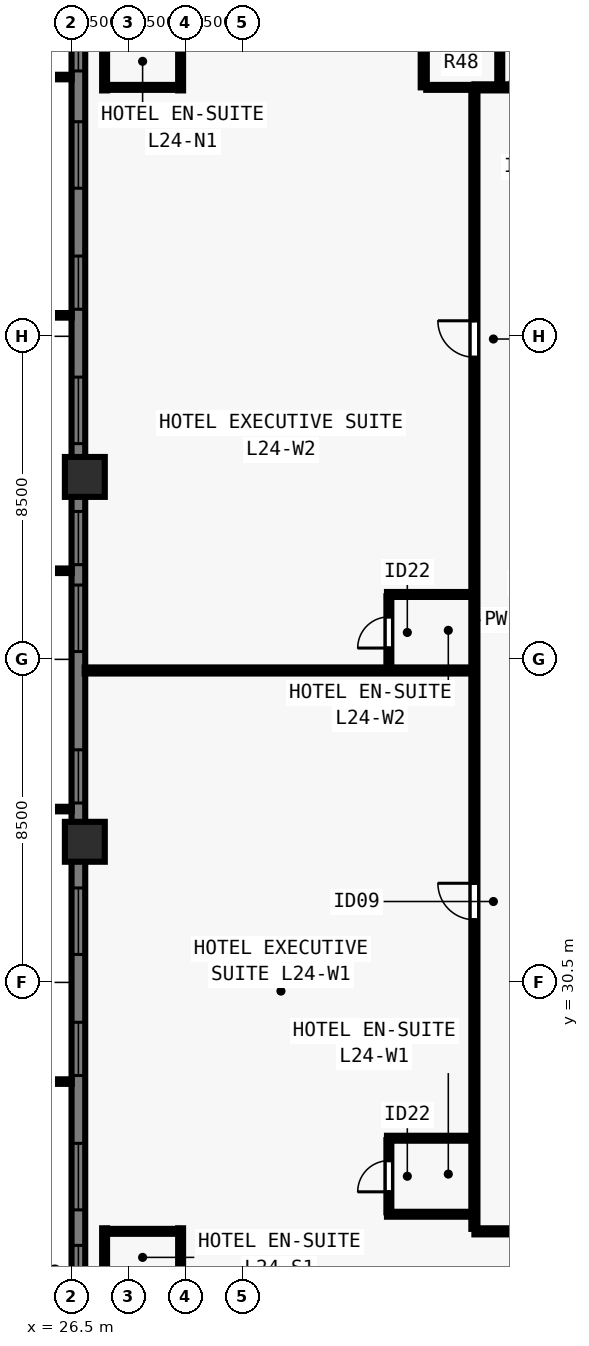
"""IFC4 building model, lengths in metres.
Left out: names, types, materials, properties, quantities, classifications, styles, units other than length and angle.
Written with IfcOpenShell. Run it as: python <this file> out.ifc"""

import sys

from ifc_helpers import new_model, si_unit, direction, frame, frame_2d, origin, origin_2d, place, context, subcontext, project, spatial, rectangle, extrude, element, fill, save


model = new_model("IFC4")
c1 = context("Model", 3, precision=1e-05, world=origin(), true_north=direction((0.0, 1.0)))
c2 = subcontext(c1, "Body", "Model", "MODEL_VIEW")
j1 = project(units=[si_unit("LENGTHUNIT", "METRE"), si_unit("PLANEANGLEUNIT", "RADIAN")], contexts=[c1])
p1 = place(None, origin())
s1 = spatial("IfcSite", under=j1, at=p1, CompositionType="ELEMENT")
p2 = place(p1, origin())
s2 = spatial("IfcBuilding", under=s1, at=p2, CompositionType="ELEMENT")
p3 = place(p2, frame((0.0, 0.0, 90.0)))
s3 = spatial("IfcBuildingStorey", under=s2, at=p3, CompositionType="ELEMENT", Elevation=90.0)
for number, where, z_axis, x_axis in (
    (1, (26.85, 43.8, 0.0), (0.0, 0.0, 1.0), (0.0, 1.0, 0.0)),
    (2, (26.85, 34.2, 0.0), (0.0, 0.0, 1.0), (0.0, 1.0, 0.0)),
):
    element("IfcColumn", number, at=place(p3, frame(where, z_axis=z_axis, x_axis=x_axis)), inside=s3, PredefinedType="COLUMN", context=c2, shape_type="SweptSolid", body=[
        extrude(rectangle(XDim=1.05, YDim=1.05, at=origin_2d()), origin(), (0.0, 0.0, 1.0), 3.5),
    ])
p4 = place(p3, frame((26.68, 16.5, 0.0), z_axis=(0.0, 0.0, 1.0), x_axis=(0.0, 1.0, 0.0)))
e3 = element("IfcWall", 3, at=p4, inside=s3, PredefinedType="SOLIDWALL", context=c2, shape_type="SweptSolid", body=[
    extrude(rectangle(XDim=44.662, YDim=0.36, at=frame_2d((22.331, 0.0))), origin(), (0.0, 0.0, 1.0), 3.28),
])
p5 = place(p4, frame((5.68, 0.0, 0.8)))
e4 = element("IfcOpeningElement", 4, at=p5, cuts=e3, PredefinedType="OPENING", context=c2, shape_type="SweptSolid", body=[
    extrude(rectangle(XDim=1.4, YDim=1.544, at=frame_2d((0.7, 0.772))), frame((0.0, 0.19, 0.0), z_axis=(0.0, -1.0, 0.0), x_axis=(1.0, 0.0, 0.0)), (0.0, 0.0, 1.0), 0.38),
])
p6 = place(p4, frame((8.015, 0.0, 0.8)))
e5 = element("IfcOpeningElement", 5, at=p6, cuts=e3, PredefinedType="OPENING", context=c2, shape_type="SweptSolid", body=[
    extrude(rectangle(XDim=1.75, YDim=1.544, at=frame_2d((0.875, 0.772))), frame((0.0, 0.19, 0.0), z_axis=(0.0, -1.0, 0.0), x_axis=(1.0, 0.0, 0.0)), (0.0, 0.0, 1.0), 0.38),
])
p7 = place(p4, frame((11.551, 0.0, 0.8)))
e6 = element("IfcOpeningElement", 6, at=p7, cuts=e3, PredefinedType="OPENING", context=c2, shape_type="SweptSolid", body=[
    extrude(rectangle(XDim=1.4, YDim=1.544, at=frame_2d((0.7, 0.772))), frame((0.0, 0.19, 0.0), z_axis=(0.0, -1.0, 0.0), x_axis=(1.0, 0.0, 0.0)), (0.0, 0.0, 1.0), 0.38),
])
p8 = place(p4, frame((14.736, 0.0, 0.8)))
e7 = element("IfcOpeningElement", 7, at=p8, cuts=e3, PredefinedType="OPENING", context=c2, shape_type="SweptSolid", body=[
    extrude(rectangle(XDim=1.75, YDim=1.544, at=frame_2d((0.875, 0.772))), frame((0.0, 0.19, 0.0), z_axis=(0.0, -1.0, 0.0), x_axis=(1.0, 0.0, 0.0)), (0.0, 0.0, 1.0), 0.38),
])
p9 = place(p4, frame((18.721, 0.0, 0.8)))
e8 = element("IfcOpeningElement", 8, at=p9, cuts=e3, PredefinedType="OPENING", context=c2, shape_type="SweptSolid", body=[
    extrude(rectangle(XDim=1.4, YDim=1.544, at=frame_2d((0.7, 0.772))), frame((0.0, 0.19, 0.0), z_axis=(0.0, -1.0, 0.0), x_axis=(1.0, 0.0, 0.0)), (0.0, 0.0, 1.0), 0.38),
])
p10 = place(p4, frame((22.706, 0.0, 0.8)))
e9 = element("IfcOpeningElement", 9, at=p10, cuts=e3, PredefinedType="OPENING", context=c2, shape_type="SweptSolid", body=[
    extrude(rectangle(XDim=1.75, YDim=1.544, at=frame_2d((0.875, 0.772))), frame((0.0, 0.19, 0.0), z_axis=(0.0, -1.0, 0.0), x_axis=(1.0, 0.0, 0.0)), (0.0, 0.0, 1.0), 0.38),
])
p11 = place(p4, frame((24.991, 0.0, 0.8)))
e10 = element("IfcOpeningElement", 10, at=p11, cuts=e3, PredefinedType="OPENING", context=c2, shape_type="SweptSolid", body=[
    extrude(rectangle(XDim=1.4, YDim=1.544, at=frame_2d((0.7, 0.772))), frame((0.0, 0.19, 0.0), z_axis=(0.0, -1.0, 0.0), x_axis=(1.0, 0.0, 0.0)), (0.0, 0.0, 1.0), 0.38),
])
p12 = place(p4, frame((28.177, 0.0, 0.8)))
e11 = element("IfcOpeningElement", 11, at=p12, cuts=e3, PredefinedType="OPENING", context=c2, shape_type="SweptSolid", body=[
    extrude(rectangle(XDim=1.75, YDim=1.544, at=frame_2d((0.875, 0.772))), frame((0.0, 0.19, 0.0), z_axis=(0.0, -1.0, 0.0), x_axis=(1.0, 0.0, 0.0)), (0.0, 0.0, 1.0), 0.38),
])
p13 = place(p4, frame((31.711, 0.0, 0.8)))
e12 = element("IfcOpeningElement", 12, at=p13, cuts=e3, PredefinedType="OPENING", context=c2, shape_type="SweptSolid", body=[
    extrude(rectangle(XDim=1.4, YDim=1.544, at=frame_2d((0.7, 0.772))), frame((0.0, 0.19, 0.0), z_axis=(0.0, -1.0, 0.0), x_axis=(1.0, 0.0, 0.0)), (0.0, 0.0, 1.0), 0.38),
])
p14 = place(p4, frame((34.897, 0.0, 0.8)))
e13 = element("IfcOpeningElement", 13, at=p14, cuts=e3, PredefinedType="OPENING", context=c2, shape_type="SweptSolid", body=[
    extrude(rectangle(XDim=1.75, YDim=1.544, at=frame_2d((0.875, 0.772))), frame((0.0, 0.19, 0.0), z_axis=(0.0, -1.0, 0.0), x_axis=(1.0, 0.0, 0.0)), (0.0, 0.0, 1.0), 0.38),
])
p15 = place(p4, frame((37.982, 0.0, 0.8)))
e14 = element("IfcOpeningElement", 14, at=p15, cuts=e3, PredefinedType="OPENING", context=c2, shape_type="SweptSolid", body=[
    extrude(rectangle(XDim=1.4, YDim=1.544, at=frame_2d((0.7, 0.772))), frame((0.0, 0.19, 0.0), z_axis=(0.0, -1.0, 0.0), x_axis=(1.0, 0.0, 0.0)), (0.0, 0.0, 1.0), 0.38),
])
p16 = place(p3, frame((37.1, 23.95, 0.0), z_axis=(0.0, 0.0, 1.0), x_axis=(1.0, 0.0, 0.0)))
e15 = element("IfcWall", 15, at=p16, inside=s3, PredefinedType="PARTITIONING", context=c2, shape_type="SweptSolid", body=[
    extrude(rectangle(XDim=29.8, YDim=0.16, at=frame_2d((14.9, 0.0))), origin(), (0.0, 0.0, 1.0), 3.28),
])
p17 = place(p16, frame((2.571, 0.0, 0.0)))
e16 = element("IfcOpeningElement", 16, at=p17, cuts=e15, PredefinedType="OPENING", context=c2, shape_type="SweptSolid", body=[
    extrude(rectangle(XDim=0.96, YDim=2.15, at=frame_2d((0.48, 1.075))), frame((0.0, 0.09, 0.0), z_axis=(0.0, -1.0, 0.0), x_axis=(1.0, 0.0, 0.0)), (0.0, 0.0, 1.0), 0.18),
])
p18 = place(p16, frame((15.42, 0.0, 0.0)))
e17 = element("IfcOpeningElement", 17, at=p18, cuts=e15, PredefinedType="OPENING", context=c2, shape_type="SweptSolid", body=[
    extrude(rectangle(XDim=0.96, YDim=2.15, at=frame_2d((0.48, 1.075))), frame((0.0, 0.09, 0.0), z_axis=(0.0, -1.0, 0.0), x_axis=(1.0, 0.0, 0.0)), (0.0, 0.0, 1.0), 0.18),
])
p19 = place(p16, frame((27.269, 0.0, 0.0)))
e18 = element("IfcOpeningElement", 18, at=p19, cuts=e15, PredefinedType="OPENING", context=c2, shape_type="SweptSolid", body=[
    extrude(rectangle(XDim=0.96, YDim=2.15, at=frame_2d((0.48, 1.075))), frame((0.0, 0.09, 0.0), z_axis=(0.0, -1.0, 0.0), x_axis=(1.0, 0.0, 0.0)), (0.0, 0.0, 1.0), 0.18),
])
p20 = place(p3, frame((37.1, 54.05, 0.0), z_axis=(0.0, 0.0, 1.0), x_axis=(1.0, 0.0, 0.0)))
e19 = element("IfcWall", 19, at=p20, inside=s3, PredefinedType="PARTITIONING", context=c2, shape_type="SweptSolid", body=[
    extrude(rectangle(XDim=29.8, YDim=0.16, at=frame_2d((14.9, 0.0))), origin(), (0.0, 0.0, 1.0), 3.28),
])
p21 = place(p20, frame((0.91, 0.0, 0.0)))
e20 = element("IfcOpeningElement", 20, at=p21, cuts=e19, PredefinedType="OPENING", context=c2, shape_type="SweptSolid", body=[
    extrude(rectangle(XDim=0.96, YDim=2.15, at=frame_2d((0.48, 1.075))), frame((0.0, 0.09, 0.0), z_axis=(0.0, -1.0, 0.0), x_axis=(1.0, 0.0, 0.0)), (0.0, 0.0, 1.0), 0.18),
])
p22 = place(p20, frame((3.03, 0.0, 0.0)))
e21 = element("IfcOpeningElement", 21, at=p22, cuts=e19, PredefinedType="OPENING", context=c2, shape_type="SweptSolid", body=[
    extrude(rectangle(XDim=0.96, YDim=2.15, at=frame_2d((0.48, 1.075))), frame((0.0, 0.09, 0.0), z_axis=(0.0, -1.0, 0.0), x_axis=(1.0, 0.0, 0.0)), (0.0, 0.0, 1.0), 0.18),
])
p23 = place(p20, frame((11.39, 0.0, 0.0)))
e22 = element("IfcOpeningElement", 22, at=p23, cuts=e19, PredefinedType="OPENING", context=c2, shape_type="SweptSolid", body=[
    extrude(rectangle(XDim=0.96, YDim=2.15, at=frame_2d((0.48, 1.075))), frame((0.0, 0.09, 0.0), z_axis=(0.0, -1.0, 0.0), x_axis=(1.0, 0.0, 0.0)), (0.0, 0.0, 1.0), 0.18),
])
p24 = place(p20, frame((19.75, 0.0, 0.0)))
e23 = element("IfcOpeningElement", 23, at=p24, cuts=e19, PredefinedType="OPENING", context=c2, shape_type="SweptSolid", body=[
    extrude(rectangle(XDim=0.96, YDim=2.15, at=frame_2d((0.48, 1.075))), frame((0.0, 0.09, 0.0), z_axis=(0.0, -1.0, 0.0), x_axis=(1.0, 0.0, 0.0)), (0.0, 0.0, 1.0), 0.18),
])
p25 = place(p20, frame((26.931, 0.0, 0.0)))
e24 = element("IfcOpeningElement", 24, at=p25, cuts=e19, PredefinedType="OPENING", context=c2, shape_type="SweptSolid", body=[
    extrude(rectangle(XDim=0.96, YDim=2.15, at=frame_2d((0.48, 1.075))), frame((0.0, 0.09, 0.0), z_axis=(0.0, -1.0, 0.0), x_axis=(1.0, 0.0, 0.0)), (0.0, 0.0, 1.0), 0.18),
])
p26 = place(p20, frame((28.48, 0.0, 0.0)))
e25 = element("IfcOpeningElement", 25, at=p26, cuts=e19, PredefinedType="OPENING", context=c2, shape_type="SweptSolid", body=[
    extrude(rectangle(XDim=0.96, YDim=2.15, at=frame_2d((0.48, 1.075))), frame((0.0, 0.09, 0.0), z_axis=(0.0, -1.0, 0.0), x_axis=(1.0, 0.0, 0.0)), (0.0, 0.0, 1.0), 0.18),
])
p27 = place(p3, frame((37.1, 24.015, 0.0), z_axis=(0.0, 0.0, 1.0), x_axis=(0.0, 1.0, 0.0)))
e26 = element("IfcWall", 26, at=p27, inside=s3, PredefinedType="PARTITIONING", context=c2, shape_type="SweptSolid", body=[
    extrude(rectangle(XDim=29.97, YDim=0.16, at=frame_2d((14.985, 0.0))), origin(), (0.0, 0.0, 1.0), 3.28),
])
p28 = place(p27, frame((8.134, 0.0, 0.0)))
e27 = element("IfcOpeningElement", 27, at=p28, cuts=e26, PredefinedType="OPENING", context=c2, shape_type="SweptSolid", body=[
    extrude(rectangle(XDim=0.96, YDim=2.15, at=frame_2d((0.48, 1.075))), frame((0.0, 0.09, 0.0), z_axis=(0.0, -1.0, 0.0), x_axis=(1.0, 0.0, 0.0)), (0.0, 0.0, 1.0), 0.18),
])
p29 = place(p27, frame((22.934, 0.0, 0.0)))
e28 = element("IfcOpeningElement", 28, at=p29, cuts=e26, PredefinedType="OPENING", context=c2, shape_type="SweptSolid", body=[
    extrude(rectangle(XDim=0.96, YDim=2.15, at=frame_2d((0.48, 1.075))), frame((0.0, 0.09, 0.0), z_axis=(0.0, -1.0, 0.0), x_axis=(1.0, 0.0, 0.0)), (0.0, 0.0, 1.0), 0.18),
])
for number, where, z_axis, x_axis in (
    (29, (27.37, 21.65, 0.0), (0.0, 0.0, 1.0), (0.0, 1.0, 0.0)),
    (30, (29.37, 21.65, 0.0), (0.0, 0.0, 1.0), (0.0, 1.0, 0.0)),
):
    element("IfcWall", number, at=place(p3, frame(where, z_axis=z_axis, x_axis=x_axis)), inside=s3, PredefinedType="PLUMBINGWALL", context=c2, shape_type="SweptSolid", body=[
        extrude(rectangle(XDim=2.38, YDim=0.13, at=frame_2d((1.19, 0.0))), origin(), (0.0, 0.0, 1.0), 3.28),
    ])
p30 = place(p3, frame((27.42, 23.95, 0.0), z_axis=(0.0, 0.0, 1.0), x_axis=(1.0, 0.0, 0.0)))
e31 = element("IfcWall", 31, at=p30, inside=s3, PredefinedType="PLUMBINGWALL", context=c2, shape_type="SweptSolid", body=[
    extrude(rectangle(XDim=1.9, YDim=0.13, at=frame_2d((0.95, 0.0))), origin(), (0.0, 0.0, 1.0), 3.28),
])
for number, where, z_axis, x_axis in (
    (32, (27.37, 53.97, 0.0), (0.0, 0.0, 1.0), (0.0, 1.0, 0.0)),
    (33, (29.37, 53.97, 0.0), (0.0, 0.0, 1.0), (0.0, 1.0, 0.0)),
):
    element("IfcWall", number, at=place(p3, frame(where, z_axis=z_axis, x_axis=x_axis)), inside=s3, PredefinedType="PLUMBINGWALL", context=c2, shape_type="SweptSolid", body=[
        extrude(rectangle(XDim=2.38, YDim=0.13, at=frame_2d((1.19, 0.0))), origin(), (0.0, 0.0, 1.0), 3.28),
    ])
p31 = place(p3, frame((27.42, 54.05, 0.0), z_axis=(0.0, 0.0, 1.0), x_axis=(1.0, 0.0, 0.0)))
e34 = element("IfcWall", 34, at=p31, inside=s3, PredefinedType="PLUMBINGWALL", context=c2, shape_type="SweptSolid", body=[
    extrude(rectangle(XDim=1.9, YDim=0.13, at=frame_2d((0.95, 0.0))), origin(), (0.0, 0.0, 1.0), 3.28),
])
p32 = place(p3, frame((35.768, 54.05, 0.0), z_axis=(0.0, 0.0, 1.0), x_axis=(0.0, 1.0, 0.0)))
e35 = element("IfcWall", 35, at=p32, inside=s3, PredefinedType="PARTITIONING", context=c2, shape_type="SweptSolid", body=[
    extrude(rectangle(XDim=10.105, YDim=0.16, at=frame_2d((5.052, 0.0))), origin(), (0.0, 0.0, 1.0), 2.439),
])
p33 = place(p3, frame((37.768, 54.115, 0.0), z_axis=(0.0, 0.0, 1.0), x_axis=(0.0, 1.0, 0.0)))
e36 = element("IfcWall", 36, at=p33, inside=s3, PredefinedType="PLUMBINGWALL", context=c2, shape_type="SweptSolid", body=[
    extrude(rectangle(XDim=2.235, YDim=0.13, at=frame_2d((1.118, 0.0))), origin(), (0.0, 0.0, 1.0), 2.439),
])
p34 = place(p3, frame((35.833, 54.05, 0.0), z_axis=(0.0, 0.0, 1.0), x_axis=(1.0, 0.0, 0.0)))
e37 = element("IfcWall", 37, at=p34, inside=s3, PredefinedType="PLUMBINGWALL", context=c2, shape_type="SweptSolid", body=[
    extrude(rectangle(XDim=1.188, YDim=0.13, at=frame_2d((0.594, 0.0))), origin(), (0.0, 0.0, 1.0), 3.28),
])
p35 = place(p3, frame((34.8, 24.4, 0.0), z_axis=(0.0, 0.0, 1.0), x_axis=(1.0, 0.0, 0.0)))
e38 = element("IfcWall", 38, at=p35, inside=s3, PredefinedType="PLUMBINGWALL", context=c2, shape_type="SweptSolid", body=[
    extrude(rectangle(XDim=2.235, YDim=0.13, at=frame_2d((1.117, 0.0))), origin(), (0.0, 0.0, 1.0), 2.849),
])
p36 = place(p3, frame((34.8, 26.4, 0.0), z_axis=(0.0, 0.0, 1.0), x_axis=(1.0, 0.0, 0.0)))
e39 = element("IfcWall", 39, at=p36, inside=s3, PredefinedType="PLUMBINGWALL", context=c2, shape_type="SweptSolid", body=[
    extrude(rectangle(XDim=2.235, YDim=0.13, at=frame_2d((1.117, 0.0))), origin(), (0.0, 0.0, 1.0), 3.28),
])
p37 = place(p3, frame((34.85, 24.45, 0.0), z_axis=(0.0, 0.0, 1.0), x_axis=(0.0, 1.0, 0.0)))
e40 = element("IfcWall", 40, at=p37, inside=s3, PredefinedType="PLUMBINGWALL", context=c2, shape_type="SweptSolid", body=[
    extrude(rectangle(XDim=1.9, YDim=0.13, at=frame_2d((0.95, 0.0))), origin(), (0.0, 0.0, 1.0), 3.28),
])
p38 = place(p37, frame((0.54, 0.0, 0.0)))
e41 = element("IfcOpeningElement", 41, at=p38, cuts=e40, PredefinedType="OPENING", context=c2, shape_type="SweptSolid", body=[
    extrude(rectangle(XDim=0.82, YDim=2.1, at=frame_2d((0.41, 1.05))), frame((0.0, 0.075, 0.0), z_axis=(0.0, -1.0, 0.0), x_axis=(1.0, 0.0, 0.0)), (0.0, 0.0, 1.0), 0.15),
])
p39 = place(p3, frame((26.845, 38.708, 0.0), z_axis=(0.0, 0.0, 1.0), x_axis=(1.0, 0.0, 0.0)))
e42 = element("IfcWall", 42, at=p39, inside=s3, PredefinedType="PARTITIONING", context=c2, shape_type="SweptSolid", body=[
    extrude(rectangle(XDim=10.19, YDim=0.16, at=frame_2d((5.095, 0.0))), origin(), (0.0, 0.0, 1.0), 2.849),
])
p40 = place(p3, frame((34.8, 40.708, 0.0), z_axis=(0.0, 0.0, 1.0), x_axis=(1.0, 0.0, 0.0)))
e43 = element("IfcWall", 43, at=p40, inside=s3, PredefinedType="PLUMBINGWALL", context=c2, shape_type="SweptSolid", body=[
    extrude(rectangle(XDim=2.235, YDim=0.13, at=frame_2d((1.117, 0.0))), origin(), (0.0, 0.0, 1.0), 2.849),
])
p41 = place(p3, frame((34.85, 38.772, 0.0), z_axis=(0.0, 0.0, 1.0), x_axis=(0.0, 1.0, 0.0)))
e44 = element("IfcWall", 44, at=p41, inside=s3, PredefinedType="PLUMBINGWALL", context=c2, shape_type="SweptSolid", body=[
    extrude(rectangle(XDim=1.885, YDim=0.13, at=frame_2d((0.942, 0.0))), origin(), (0.0, 0.0, 1.0), 3.28),
])
p42 = place(p41, frame((0.525, 0.0, 0.0)))
e45 = element("IfcOpeningElement", 45, at=p42, cuts=e44, PredefinedType="OPENING", context=c2, shape_type="SweptSolid", body=[
    extrude(rectangle(XDim=0.82, YDim=2.1, at=frame_2d((0.41, 1.05))), frame((0.0, 0.075, 0.0), z_axis=(0.0, -1.0, 0.0), x_axis=(1.0, 0.0, 0.0)), (0.0, 0.0, 1.0), 0.15),
])
p43 = place(p5, origin())
e46 = element("IfcWindow", 46, at=p43, inside=s3, PartitioningType="SINGLE_PANEL", PredefinedType="WINDOW", context=c2, shape_type="SweptSolid", body=[
    extrude(rectangle(XDim=1.4, YDim=1.544, at=frame_2d((0.7, 0.772))), frame((0.0, -0.05, 0.0), z_axis=(0.0, -1.0, 0.0), x_axis=(1.0, 0.0, 0.0)), (0.0, 0.0, 1.0), 0.06),
])
fill(e4, e46)
p44 = place(p6, origin())
e47 = element("IfcWindow", 47, at=p44, inside=s3, PartitioningType="SINGLE_PANEL", PredefinedType="WINDOW", context=c2, shape_type="SweptSolid", body=[
    extrude(rectangle(XDim=1.75, YDim=1.544, at=frame_2d((0.875, 0.772))), frame((0.0, -0.05, 0.0), z_axis=(0.0, -1.0, 0.0), x_axis=(1.0, 0.0, 0.0)), (0.0, 0.0, 1.0), 0.06),
])
fill(e5, e47)
p45 = place(p7, origin())
e48 = element("IfcWindow", 48, at=p45, inside=s3, PartitioningType="SINGLE_PANEL", PredefinedType="WINDOW", context=c2, shape_type="SweptSolid", body=[
    extrude(rectangle(XDim=1.4, YDim=1.544, at=frame_2d((0.7, 0.772))), frame((0.0, -0.05, 0.0), z_axis=(0.0, -1.0, 0.0), x_axis=(1.0, 0.0, 0.0)), (0.0, 0.0, 1.0), 0.06),
])
fill(e6, e48)
p46 = place(p8, origin())
e49 = element("IfcWindow", 49, at=p46, inside=s3, PartitioningType="SINGLE_PANEL", PredefinedType="WINDOW", context=c2, shape_type="SweptSolid", body=[
    extrude(rectangle(XDim=1.75, YDim=1.544, at=frame_2d((0.875, 0.772))), frame((0.0, -0.05, 0.0), z_axis=(0.0, -1.0, 0.0), x_axis=(1.0, 0.0, 0.0)), (0.0, 0.0, 1.0), 0.06),
])
fill(e7, e49)
p47 = place(p9, origin())
e50 = element("IfcWindow", 50, at=p47, inside=s3, PartitioningType="SINGLE_PANEL", PredefinedType="WINDOW", context=c2, shape_type="SweptSolid", body=[
    extrude(rectangle(XDim=1.4, YDim=1.544, at=frame_2d((0.7, 0.772))), frame((0.0, -0.05, 0.0), z_axis=(0.0, -1.0, 0.0), x_axis=(1.0, 0.0, 0.0)), (0.0, 0.0, 1.0), 0.06),
])
fill(e8, e50)
p48 = place(p10, origin())
e51 = element("IfcWindow", 51, at=p48, inside=s3, PartitioningType="SINGLE_PANEL", PredefinedType="WINDOW", context=c2, shape_type="SweptSolid", body=[
    extrude(rectangle(XDim=1.75, YDim=1.544, at=frame_2d((0.875, 0.772))), frame((0.0, -0.05, 0.0), z_axis=(0.0, -1.0, 0.0), x_axis=(1.0, 0.0, 0.0)), (0.0, 0.0, 1.0), 0.06),
])
fill(e9, e51)
p49 = place(p11, origin())
e52 = element("IfcWindow", 52, at=p49, inside=s3, PartitioningType="SINGLE_PANEL", PredefinedType="WINDOW", context=c2, shape_type="SweptSolid", body=[
    extrude(rectangle(XDim=1.4, YDim=1.544, at=frame_2d((0.7, 0.772))), frame((0.0, -0.05, 0.0), z_axis=(0.0, -1.0, 0.0), x_axis=(1.0, 0.0, 0.0)), (0.0, 0.0, 1.0), 0.06),
])
fill(e10, e52)
p50 = place(p12, origin())
e53 = element("IfcWindow", 53, at=p50, inside=s3, PartitioningType="SINGLE_PANEL", PredefinedType="WINDOW", context=c2, shape_type="SweptSolid", body=[
    extrude(rectangle(XDim=1.75, YDim=1.544, at=frame_2d((0.875, 0.772))), frame((0.0, -0.05, 0.0), z_axis=(0.0, -1.0, 0.0), x_axis=(1.0, 0.0, 0.0)), (0.0, 0.0, 1.0), 0.06),
])
fill(e11, e53)
p51 = place(p13, origin())
e54 = element("IfcWindow", 54, at=p51, inside=s3, PartitioningType="SINGLE_PANEL", PredefinedType="WINDOW", context=c2, shape_type="SweptSolid", body=[
    extrude(rectangle(XDim=1.4, YDim=1.544, at=frame_2d((0.7, 0.772))), frame((0.0, -0.05, 0.0), z_axis=(0.0, -1.0, 0.0), x_axis=(1.0, 0.0, 0.0)), (0.0, 0.0, 1.0), 0.06),
])
fill(e12, e54)
p52 = place(p14, origin())
e55 = element("IfcWindow", 55, at=p52, inside=s3, PartitioningType="SINGLE_PANEL", PredefinedType="WINDOW", context=c2, shape_type="SweptSolid", body=[
    extrude(rectangle(XDim=1.75, YDim=1.544, at=frame_2d((0.875, 0.772))), frame((0.0, -0.05, 0.0), z_axis=(0.0, -1.0, 0.0), x_axis=(1.0, 0.0, 0.0)), (0.0, 0.0, 1.0), 0.06),
])
fill(e13, e55)
p53 = place(p15, origin())
e56 = element("IfcWindow", 56, at=p53, inside=s3, PartitioningType="SINGLE_PANEL", PredefinedType="WINDOW", context=c2, shape_type="SweptSolid", body=[
    extrude(rectangle(XDim=1.4, YDim=1.544, at=frame_2d((0.7, 0.772))), frame((0.0, -0.05, 0.0), z_axis=(0.0, -1.0, 0.0), x_axis=(1.0, 0.0, 0.0)), (0.0, 0.0, 1.0), 0.06),
])
fill(e14, e56)
p54 = place(p21, origin())
e57 = element("IfcDoor", 57, at=p54, inside=s3, OperationType="SINGLE_SWING_RIGHT", PredefinedType="DOOR", context=c2, shape_type="SweptSolid", body=[
    extrude(rectangle(XDim=0.96, YDim=2.15, at=frame_2d((0.48, 1.075))), frame((0.0, 0.025, 0.0), z_axis=(0.0, -1.0, 0.0), x_axis=(1.0, 0.0, 0.0)), (0.0, 0.0, 1.0), 0.05),
])
fill(e20, e57)
p55 = place(p38, origin())
e58 = element("IfcDoor", 58, at=p55, inside=s3, OperationType="SINGLE_SWING_LEFT", PredefinedType="DOOR", context=c2, shape_type="SweptSolid", body=[
    extrude(rectangle(XDim=0.82, YDim=2.1, at=frame_2d((0.41, 1.05))), frame((0.0, 0.025, 0.0), z_axis=(0.0, -1.0, 0.0), x_axis=(1.0, 0.0, 0.0)), (0.0, 0.0, 1.0), 0.05),
])
fill(e41, e58)
p56 = place(p28, origin())
e59 = element("IfcDoor", 59, at=p56, inside=s3, OperationType="SINGLE_SWING_RIGHT", PredefinedType="DOOR", context=c2, shape_type="SweptSolid", body=[
    extrude(rectangle(XDim=0.96, YDim=2.15, at=frame_2d((0.48, 1.075))), frame((0.0, 0.025, 0.0), z_axis=(0.0, -1.0, 0.0), x_axis=(1.0, 0.0, 0.0)), (0.0, 0.0, 1.0), 0.05),
])
fill(e27, e59)
p57 = place(p42, origin())
e60 = element("IfcDoor", 60, at=p57, inside=s3, OperationType="SINGLE_SWING_LEFT", PredefinedType="DOOR", context=c2, shape_type="SweptSolid", body=[
    extrude(rectangle(XDim=0.82, YDim=2.1, at=frame_2d((0.41, 1.05))), frame((0.0, 0.025, 0.0), z_axis=(0.0, -1.0, 0.0), x_axis=(1.0, 0.0, 0.0)), (0.0, 0.0, 1.0), 0.05),
])
fill(e45, e60)
p58 = place(p29, origin())
e61 = element("IfcDoor", 61, at=p58, inside=s3, OperationType="SINGLE_SWING_RIGHT", PredefinedType="DOOR", context=c2, shape_type="SweptSolid", body=[
    extrude(rectangle(XDim=0.96, YDim=2.15, at=frame_2d((0.48, 1.075))), frame((0.0, 0.025, 0.0), z_axis=(0.0, -1.0, 0.0), x_axis=(1.0, 0.0, 0.0)), (0.0, 0.0, 1.0), 0.05),
])
fill(e28, e61)
save(model, sys.argv[1])
